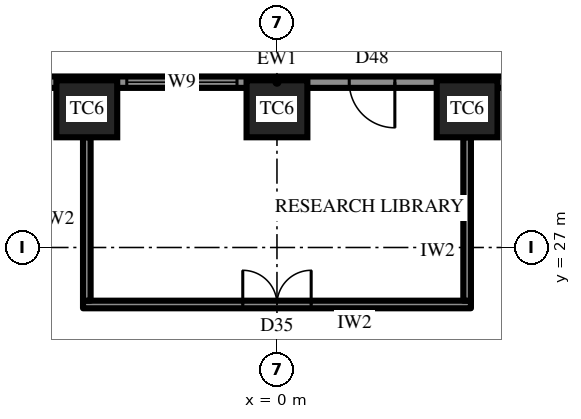
"""IFC4 building model, lengths in metres.
Left out: names, types, materials, properties, quantities, classifications, styles, units other than length and angle.
Written with IfcOpenShell. Run it as: python <this file> out.ifc"""

import sys

from ifc_helpers import new_model, si_unit, direction, frame, frame_2d, origin, origin_2d, place, context, subcontext, project, spatial, rectangle, extrude, element, fill, save


model = new_model("IFC4")
c1 = context("Model", 3, precision=1e-05, world=origin(), true_north=direction((0.0, 1.0)))
c2 = subcontext(c1, "Body", "Model", "MODEL_VIEW")
j1 = project(units=[si_unit("LENGTHUNIT", "METRE"), si_unit("PLANEANGLEUNIT", "RADIAN")], contexts=[c1])
p1 = place(None, origin())
s1 = spatial("IfcSite", under=j1, at=p1, CompositionType="ELEMENT")
p2 = place(p1, origin())
s2 = spatial("IfcBuilding", under=s1, at=p2, CompositionType="ELEMENT")
p3 = place(p2, frame((0.0, 0.0, 148.9)))
s3 = spatial("IfcBuildingStorey", under=s2, at=p3, CompositionType="ELEMENT", Elevation=148.9)
for number, where, z_axis, x_axis in (
    (1, (5.004, 30.65, 0.0), (0.0, 0.0, 1.0), (-1.0, 0.0, 0.0)),
    (2, (0.0, 30.65, 0.0), (0.0, 0.0, 1.0), (-1.0, 0.0, 0.0)),
    (3, (-5.004, 30.65, 0.0), (0.0, 0.0, 1.0), (-1.0, 0.0, 0.0)),
):
    element("IfcColumn", number, at=place(p3, frame(where, z_axis=z_axis, x_axis=x_axis)), inside=s3, PredefinedType="COLUMN", context=c2, shape_type="SweptSolid", body=[
        extrude(rectangle(XDim=1.6, YDim=1.5, at=origin_2d()), origin(), (0.0, 0.0, 1.0), 4.2),
    ])
p4 = place(p3, frame((15.011, 31.35, 0.0), z_axis=(0.0, 0.0, 1.0), x_axis=(-1.0, 0.0, 0.0)))
e4 = element("IfcWall", 4, at=p4, inside=s3, PredefinedType="SOLIDWALL", context=c2, shape_type="SweptSolid", body=[
    extrude(rectangle(XDim=30.022, YDim=0.3, at=frame_2d((15.011, 0.0))), origin(), (0.0, 0.0, 1.0), 2.75),
])
p5 = place(p4, frame((1.052, 0.0, 0.6)))
e5 = element("IfcOpeningElement", 5, at=p5, cuts=e4, PredefinedType="OPENING", context=c2, shape_type="SweptSolid", body=[
    extrude(rectangle(XDim=2.9, YDim=1.9, at=frame_2d((1.45, 0.95))), frame((0.0, 0.16, 0.0), z_axis=(0.0, -1.0, 0.0), x_axis=(1.0, 0.0, 0.0)), (0.0, 0.0, 1.0), 0.32),
])
p6 = place(p4, frame((6.056, 0.0, 0.6)))
e6 = element("IfcOpeningElement", 6, at=p6, cuts=e4, PredefinedType="OPENING", context=c2, shape_type="SweptSolid", body=[
    extrude(rectangle(XDim=2.9, YDim=1.9, at=frame_2d((1.45, 0.95))), frame((0.0, 0.16, 0.0), z_axis=(0.0, -1.0, 0.0), x_axis=(1.0, 0.0, 0.0)), (0.0, 0.0, 1.0), 0.32),
])
p7 = place(p4, frame((11.909, 0.0, 0.0)))
e7 = element("IfcOpeningElement", 7, at=p7, cuts=e4, PredefinedType="OPENING", context=c2, shape_type="SweptSolid", body=[
    extrude(rectangle(XDim=1.2, YDim=2.4, at=frame_2d((0.6, 1.2))), frame((0.0, 0.16, 0.0), z_axis=(0.0, -1.0, 0.0), x_axis=(1.0, 0.0, 0.0)), (0.0, 0.0, 1.0), 0.32),
])
p8 = place(p4, frame((16.063, 0.0, 0.6)))
e8 = element("IfcOpeningElement", 8, at=p8, cuts=e4, PredefinedType="OPENING", context=c2, shape_type="SweptSolid", body=[
    extrude(rectangle(XDim=2.9, YDim=1.9, at=frame_2d((1.45, 0.95))), frame((0.0, 0.16, 0.0), z_axis=(0.0, -1.0, 0.0), x_axis=(1.0, 0.0, 0.0)), (0.0, 0.0, 1.0), 0.32),
])
p9 = place(p4, frame((21.067, 0.0, 0.6)))
e9 = element("IfcOpeningElement", 9, at=p9, cuts=e4, PredefinedType="OPENING", context=c2, shape_type="SweptSolid", body=[
    extrude(rectangle(XDim=2.9, YDim=1.9, at=frame_2d((1.45, 0.95))), frame((0.0, 0.16, 0.0), z_axis=(0.0, -1.0, 0.0), x_axis=(1.0, 0.0, 0.0)), (0.0, 0.0, 1.0), 0.32),
])
p10 = place(p4, frame((26.07, 0.0, 0.6)))
e10 = element("IfcOpeningElement", 10, at=p10, cuts=e4, PredefinedType="OPENING", context=c2, shape_type="SweptSolid", body=[
    extrude(rectangle(XDim=2.9, YDim=1.9, at=frame_2d((1.45, 0.95))), frame((0.0, 0.16, 0.0), z_axis=(0.0, -1.0, 0.0), x_axis=(1.0, 0.0, 0.0)), (0.0, 0.0, 1.0), 0.32),
])
p11 = place(p3, frame((5.104, 25.5, 0.0), z_axis=(0.0, 0.0, 1.0), x_axis=(-1.0, 0.0, 0.0)))
e11 = element("IfcWall", 11, at=p11, inside=s3, PredefinedType="PARTITIONING", context=c2, shape_type="SweptSolid", body=[
    extrude(rectangle(XDim=10.208, YDim=0.2, at=frame_2d((5.104, 0.0))), origin(), (0.0, 0.0, 1.0), 4.0),
])
p12 = place(p11, frame((4.204, 0.0, 0.0)))
e12 = element("IfcOpeningElement", 12, at=p12, cuts=e11, PredefinedType="OPENING", context=c2, shape_type="SweptSolid", body=[
    extrude(rectangle(XDim=1.8, YDim=2.4, at=frame_2d((0.9, 1.2))), frame((0.0, 0.11, 0.0), z_axis=(0.0, -1.0, 0.0), x_axis=(1.0, 0.0, 0.0)), (0.0, 0.0, 1.0), 0.22),
])
for number, where, z_axis, x_axis in (
    (13, (5.004, 25.6, 0.0), (0.0, 0.0, 1.0), (0.0, 1.0, 0.0)),
    (14, (-5.004, 25.6, 0.0), (0.0, 0.0, 1.0), (0.0, 1.0, 0.0)),
):
    element("IfcWall", number, at=place(p3, frame(where, z_axis=z_axis, x_axis=x_axis)), inside=s3, PredefinedType="PARTITIONING", context=c2, shape_type="SweptSolid", body=[
        extrude(rectangle(XDim=4.3, YDim=0.2, at=frame_2d((2.15, 0.0))), origin(), (0.0, 0.0, 1.0), 2.992),
    ])
p13 = place(p7, origin())
e15 = element("IfcDoor", 15, at=p13, inside=s3, OperationType="SINGLE_SWING_RIGHT", PredefinedType="DOOR", context=c2, shape_type="SweptSolid", body=[
    extrude(rectangle(XDim=1.2, YDim=2.4, at=frame_2d((0.6, 1.2))), frame((0.0, 0.025, 0.0), z_axis=(0.0, -1.0, 0.0), x_axis=(1.0, 0.0, 0.0)), (0.0, 0.0, 1.0), 0.05),
])
fill(e7, e15)
p14 = place(p8, origin())
e16 = element("IfcWindow", 16, at=p14, inside=s3, PartitioningType="SINGLE_PANEL", PredefinedType="WINDOW", context=c2, shape_type="SweptSolid", body=[
    extrude(rectangle(XDim=2.9, YDim=1.9, at=frame_2d((1.45, 0.95))), frame((0.0, 0.03, 0.0), z_axis=(0.0, -1.0, 0.0), x_axis=(1.0, 0.0, 0.0)), (0.0, 0.0, 1.0), 0.06),
])
fill(e8, e16)
p15 = place(p12, frame((1.8, 0.0, 0.0), z_axis=(0.0, 0.0, 1.0), x_axis=(-1.0, 0.0, 0.0)))
e17 = element("IfcDoor", 17, at=p15, inside=s3, OperationType="DOUBLE_DOOR_SINGLE_SWING", PredefinedType="DOOR", context=c2, shape_type="SweptSolid", body=[
    extrude(rectangle(XDim=1.8, YDim=2.4, at=frame_2d((0.9, 1.2))), frame((0.0, 0.025, 0.0), z_axis=(0.0, -1.0, 0.0), x_axis=(1.0, 0.0, 0.0)), (0.0, 0.0, 1.0), 0.05),
])
fill(e12, e17)
save(model, sys.argv[1])
